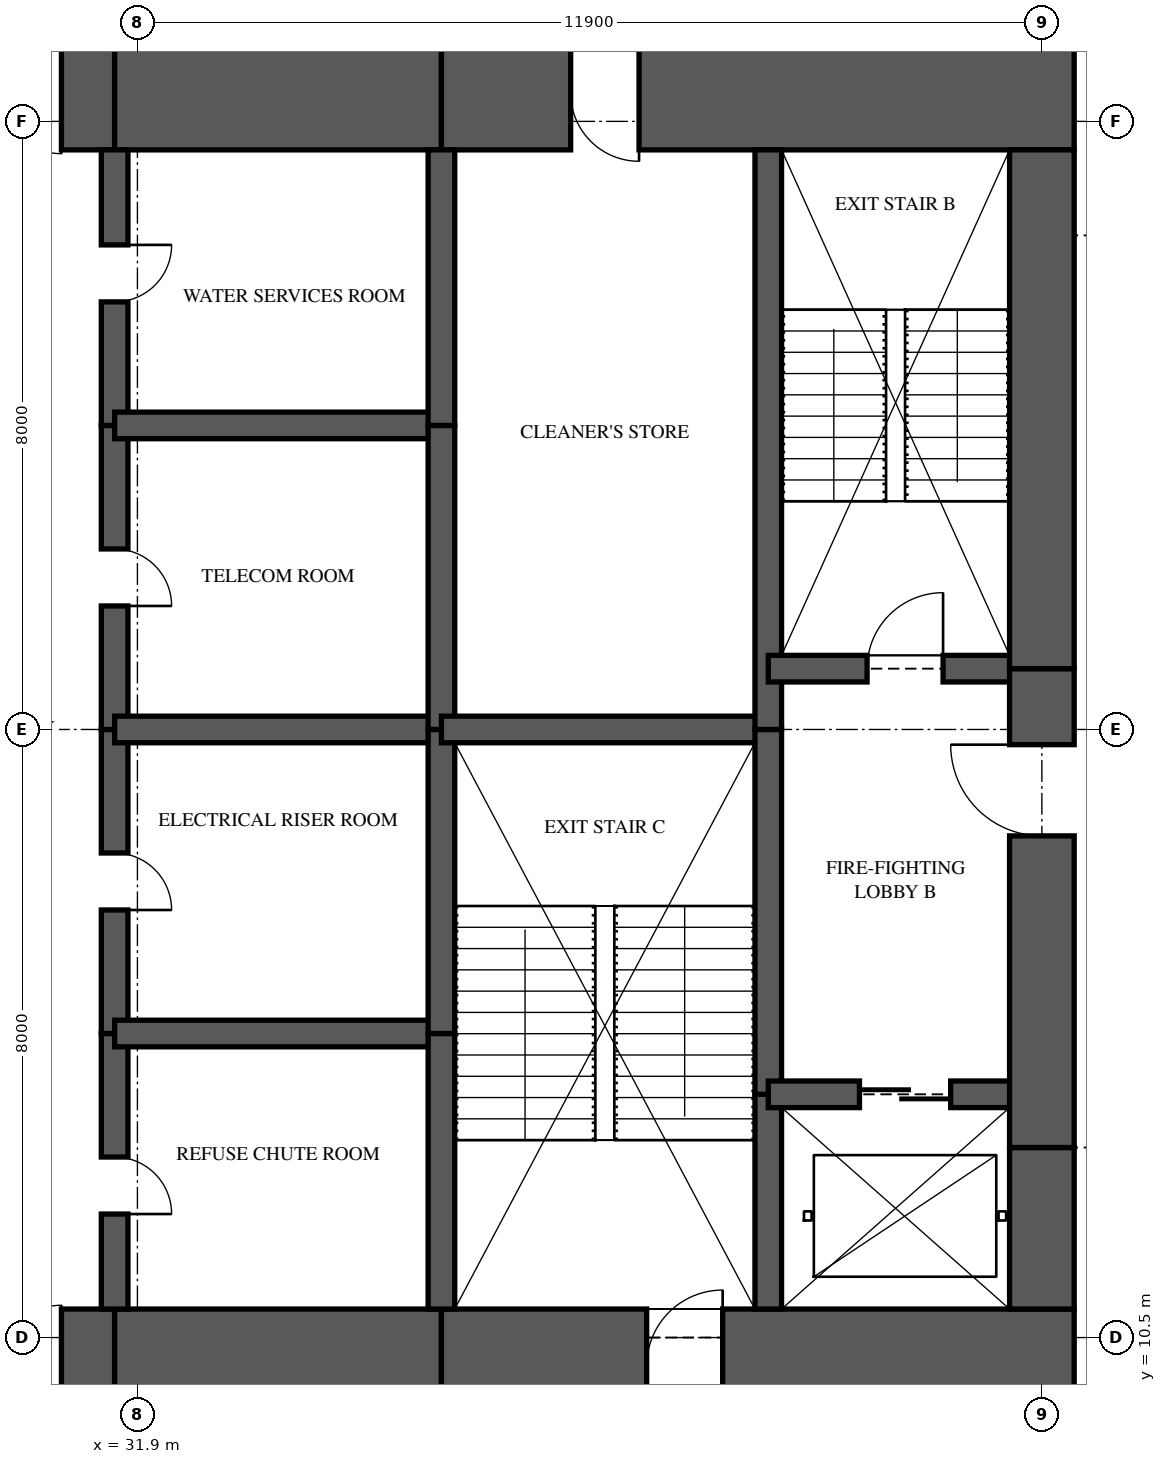
"""IFC4 building model, lengths in metres.
Left out: names, types, materials, properties, quantities, classifications, styles, units other than length and angle.
Written with IfcOpenShell. Run it as: python <this file> out.ifc"""

import sys

from ifc_helpers import new_model, si_unit, direction, frame, frame_2d, origin, place, context, subcontext, project, spatial, rectangle, extrude, element, fill, save


model = new_model("IFC4")
c1 = context("Model", 3, precision=1e-05, world=origin(), true_north=direction((0.0, 1.0)))
c2 = subcontext(c1, "Body", "Model", "MODEL_VIEW")
j1 = project(units=[si_unit("LENGTHUNIT", "METRE"), si_unit("PLANEANGLEUNIT", "RADIAN")], contexts=[c1])
p1 = place(None, origin())
s1 = spatial("IfcSite", under=j1, at=p1, CompositionType="ELEMENT")
p2 = place(p1, origin())
s2 = spatial("IfcBuilding", under=s1, at=p2, CompositionType="ELEMENT")
p3 = place(p2, frame((0.0, 0.0, 128.3)))
s3 = spatial("IfcBuildingStorey", under=s2, at=p3, CompositionType="ELEMENT", Elevation=128.3)
p4 = place(p3, frame((26.0, 10.125, 0.0), z_axis=(0.0, 0.0, 1.0), x_axis=(1.0, 0.0, 0.0)))
e1 = element("IfcWall", 1, at=p4, inside=s3, PredefinedType="SHEAR", context=c2, shape_type="SweptSolid", body=[
    extrude(rectangle(XDim=5.6, YDim=1.5, at=frame_2d((2.8, 0.0))), origin(), (0.0, 0.0, 1.0), 3.35),
])
p5 = place(p4, frame((3.3, 0.0, 0.0)))
e2 = element("IfcOpeningElement", 2, at=p5, cuts=e1, PredefinedType="OPENING", context=c2, shape_type="SweptSolid", body=[
    extrude(rectangle(XDim=1.6, YDim=2.1, at=frame_2d((0.8, 1.05))), frame((0.0, 0.76, 0.0), z_axis=(0.0, -1.0, 0.0), x_axis=(1.0, 0.0, 0.0)), (0.0, 0.0, 1.0), 1.52),
])
p6 = place(p3, frame((31.6, 10.125, 0.0), z_axis=(0.0, 0.0, 1.0), x_axis=(1.0, 0.0, 0.0)))
e3 = element("IfcWall", 3, at=p6, inside=s3, PredefinedType="SHEAR", context=c2, shape_type="SweptSolid", body=[
    extrude(rectangle(XDim=4.3, YDim=1.5, at=frame_2d((2.15, 0.0))), origin(), (0.0, 0.0, 1.0), 3.35),
])
p7 = place(p3, frame((35.9, 10.125, 0.0), z_axis=(0.0, 0.0, 1.0), x_axis=(1.0, 0.0, 0.0)))
e4 = element("IfcWall", 4, at=p7, inside=s3, PredefinedType="SHEAR", context=c2, shape_type="SweptSolid", body=[
    extrude(rectangle(XDim=8.325, YDim=1.5, at=frame_2d((4.163, 0.0))), origin(), (0.0, 0.0, 1.0), 3.35),
])
p8 = place(p7, frame((2.7, 0.0, 0.0)))
e5 = element("IfcOpeningElement", 5, at=p8, cuts=e4, PredefinedType="OPENING", context=c2, shape_type="SweptSolid", body=[
    extrude(rectangle(XDim=1.0, YDim=2.1, at=frame_2d((0.5, 1.05))), frame((0.0, 0.76, 0.0), z_axis=(0.0, -1.0, 0.0), x_axis=(1.0, 0.0, 0.0)), (0.0, 0.0, 1.0), 1.52),
])
p9 = place(p3, frame((44.225, 26.875, 0.0), z_axis=(0.0, 0.0, 1.0), x_axis=(-1.0, 0.0, 0.0)))
e6 = element("IfcWall", 6, at=p9, inside=s3, PredefinedType="SHEAR", context=c2, shape_type="SweptSolid", body=[
    extrude(rectangle(XDim=8.325, YDim=1.5, at=frame_2d((4.163, 0.0))), origin(), (0.0, 0.0, 1.0), 3.35),
])
p10 = place(p9, frame((5.725, 0.0, 0.0)))
e7 = element("IfcOpeningElement", 7, at=p10, cuts=e6, PredefinedType="OPENING", context=c2, shape_type="SweptSolid", body=[
    extrude(rectangle(XDim=0.9, YDim=2.1, at=frame_2d((0.45, 1.05))), frame((0.0, 0.76, 0.0), z_axis=(0.0, -1.0, 0.0), x_axis=(1.0, 0.0, 0.0)), (0.0, 0.0, 1.0), 1.52),
])
p11 = place(p3, frame((35.9, 26.875, 0.0), z_axis=(0.0, 0.0, 1.0), x_axis=(-1.0, 0.0, 0.0)))
e8 = element("IfcWall", 8, at=p11, inside=s3, PredefinedType="SHEAR", context=c2, shape_type="SweptSolid", body=[
    extrude(rectangle(XDim=4.3, YDim=1.5, at=frame_2d((2.15, 0.0))), origin(), (0.0, 0.0, 1.0), 3.35),
])
p12 = place(p3, frame((31.6, 26.875, 0.0), z_axis=(0.0, 0.0, 1.0), x_axis=(-1.0, 0.0, 0.0)))
e9 = element("IfcWall", 9, at=p12, inside=s3, PredefinedType="SHEAR", context=c2, shape_type="SweptSolid", body=[
    extrude(rectangle(XDim=5.6, YDim=1.5, at=frame_2d((2.8, 0.0))), origin(), (0.0, 0.0, 1.0), 3.35),
])
p13 = place(p12, frame((0.7, 0.0, 0.0)))
e10 = element("IfcOpeningElement", 10, at=p13, cuts=e9, PredefinedType="OPENING", context=c2, shape_type="SweptSolid", body=[
    extrude(rectangle(XDim=1.6, YDim=2.1, at=frame_2d((0.8, 1.05))), frame((0.0, 0.76, 0.0), z_axis=(0.0, -1.0, 0.0), x_axis=(1.0, 0.0, 0.0)), (0.0, 0.0, 1.0), 1.52),
])
p14 = place(p3, frame((43.8, 10.875, 0.0), z_axis=(0.0, 0.0, 1.0), x_axis=(0.0, 1.0, 0.0)))
e11 = element("IfcWall", 11, at=p14, inside=s3, PredefinedType="SHEAR", context=c2, shape_type="SweptSolid", body=[
    extrude(rectangle(XDim=2.125, YDim=0.85, at=frame_2d((1.062, 0.0))), origin(), (0.0, 0.0, 1.0), 3.35),
])
p15 = place(p3, frame((43.8, 13.0, 0.0), z_axis=(0.0, 0.0, 1.0), x_axis=(0.0, 1.0, 0.0)))
e12 = element("IfcWall", 12, at=p15, inside=s3, PredefinedType="SHEAR", context=c2, shape_type="SweptSolid", body=[
    extrude(rectangle(XDim=6.3, YDim=0.85, at=frame_2d((3.15, 0.0))), origin(), (0.0, 0.0, 1.0), 3.35),
])
p16 = place(p15, frame((4.1, 0.0, 0.0)))
e13 = element("IfcOpeningElement", 13, at=p16, cuts=e12, PredefinedType="OPENING", context=c2, shape_type="SweptSolid", body=[
    extrude(rectangle(XDim=1.2, YDim=2.2, at=frame_2d((0.6, 1.1))), frame((0.0, 0.435, 0.0), z_axis=(0.0, -1.0, 0.0), x_axis=(1.0, 0.0, 0.0)), (0.0, 0.0, 1.0), 0.87),
])
p17 = place(p3, frame((43.8, 19.3, 0.0), z_axis=(0.0, 0.0, 1.0), x_axis=(0.0, 1.0, 0.0)))
e14 = element("IfcWall", 14, at=p17, inside=s3, PredefinedType="SHEAR", context=c2, shape_type="SweptSolid", body=[
    extrude(rectangle(XDim=6.825, YDim=0.85, at=frame_2d((3.413, 0.0))), origin(), (0.0, 0.0, 1.0), 3.35),
])
p18 = place(p3, frame((31.6, 10.875, 0.0), z_axis=(0.0, 0.0, 1.0), x_axis=(0.0, 1.0, 0.0)))
e15 = element("IfcWall", 15, at=p18, inside=s3, PredefinedType="SHEAR", context=c2, shape_type="SweptSolid", body=[
    extrude(rectangle(XDim=3.625, YDim=0.35, at=frame_2d((1.812, 0.0))), origin(), (0.0, 0.0, 1.0), 3.35),
])
p19 = place(p18, frame((1.25, 0.0, 0.0)))
e16 = element("IfcOpeningElement", 16, at=p19, cuts=e15, PredefinedType="OPENING", context=c2, shape_type="SweptSolid", body=[
    extrude(rectangle(XDim=0.75, YDim=2.1, at=frame_2d((0.375, 1.05))), frame((0.0, 0.185, 0.0), z_axis=(0.0, -1.0, 0.0), x_axis=(1.0, 0.0, 0.0)), (0.0, 0.0, 1.0), 0.37),
])
p20 = place(p3, frame((31.6, 14.5, 0.0), z_axis=(0.0, 0.0, 1.0), x_axis=(0.0, 1.0, 0.0)))
e17 = element("IfcWall", 17, at=p20, inside=s3, PredefinedType="SHEAR", context=c2, shape_type="SweptSolid", body=[
    extrude(rectangle(XDim=4.0, YDim=0.35, at=frame_2d((2.0, 0.0))), origin(), (0.0, 0.0, 1.0), 3.35),
])
p21 = place(p20, frame((1.625, 0.0, 0.0)))
e18 = element("IfcOpeningElement", 18, at=p21, cuts=e17, PredefinedType="OPENING", context=c2, shape_type="SweptSolid", body=[
    extrude(rectangle(XDim=0.75, YDim=2.1, at=frame_2d((0.375, 1.05))), frame((0.0, 0.185, 0.0), z_axis=(0.0, -1.0, 0.0), x_axis=(1.0, 0.0, 0.0)), (0.0, 0.0, 1.0), 0.37),
])
p22 = place(p3, frame((31.6, 18.5, 0.0), z_axis=(0.0, 0.0, 1.0), x_axis=(0.0, 1.0, 0.0)))
e19 = element("IfcWall", 19, at=p22, inside=s3, PredefinedType="SHEAR", context=c2, shape_type="SweptSolid", body=[
    extrude(rectangle(XDim=4.0, YDim=0.35, at=frame_2d((2.0, 0.0))), origin(), (0.0, 0.0, 1.0), 3.35),
])
p23 = place(p22, frame((1.625, 0.0, 0.0)))
e20 = element("IfcOpeningElement", 20, at=p23, cuts=e19, PredefinedType="OPENING", context=c2, shape_type="SweptSolid", body=[
    extrude(rectangle(XDim=0.75, YDim=2.1, at=frame_2d((0.375, 1.05))), frame((0.0, 0.185, 0.0), z_axis=(0.0, -1.0, 0.0), x_axis=(1.0, 0.0, 0.0)), (0.0, 0.0, 1.0), 0.37),
])
p24 = place(p3, frame((31.6, 22.5, 0.0), z_axis=(0.0, 0.0, 1.0), x_axis=(0.0, 1.0, 0.0)))
e21 = element("IfcWall", 21, at=p24, inside=s3, PredefinedType="SHEAR", context=c2, shape_type="SweptSolid", body=[
    extrude(rectangle(XDim=3.625, YDim=0.35, at=frame_2d((1.812, 0.0))), origin(), (0.0, 0.0, 1.0), 3.35),
])
p25 = place(p24, frame((1.625, 0.0, 0.0)))
e22 = element("IfcOpeningElement", 22, at=p25, cuts=e21, PredefinedType="OPENING", context=c2, shape_type="SweptSolid", body=[
    extrude(rectangle(XDim=0.75, YDim=2.1, at=frame_2d((0.375, 1.05))), frame((0.0, 0.185, 0.0), z_axis=(0.0, -1.0, 0.0), x_axis=(1.0, 0.0, 0.0)), (0.0, 0.0, 1.0), 0.37),
])
p26 = place(p3, frame((35.9, 10.875, 0.0), z_axis=(0.0, 0.0, 1.0), x_axis=(0.0, 1.0, 0.0)))
e23 = element("IfcWall", 23, at=p26, inside=s3, PredefinedType="SHEAR", context=c2, shape_type="SweptSolid", body=[
    extrude(rectangle(XDim=3.625, YDim=0.35, at=frame_2d((1.812, 0.0))), origin(), (0.0, 0.0, 1.0), 3.35),
])
for number, where, z_axis, x_axis in (
    (24, (35.9, 14.5, 0.0), (0.0, 0.0, 1.0), (0.0, 1.0, 0.0)),
    (25, (35.9, 18.5, 0.0), (0.0, 0.0, 1.0), (0.0, 1.0, 0.0)),
):
    element("IfcWall", number, at=place(p3, frame(where, z_axis=z_axis, x_axis=x_axis)), inside=s3, PredefinedType="SHEAR", context=c2, shape_type="SweptSolid", body=[
        extrude(rectangle(XDim=4.0, YDim=0.35, at=frame_2d((2.0, 0.0))), origin(), (0.0, 0.0, 1.0), 3.35),
    ])
p27 = place(p3, frame((35.9, 22.5, 0.0), z_axis=(0.0, 0.0, 1.0), x_axis=(0.0, 1.0, 0.0)))
e26 = element("IfcWall", 26, at=p27, inside=s3, PredefinedType="SHEAR", context=c2, shape_type="SweptSolid", body=[
    extrude(rectangle(XDim=3.625, YDim=0.35, at=frame_2d((1.812, 0.0))), origin(), (0.0, 0.0, 1.0), 3.35),
])
p28 = place(p3, frame((40.2, 10.875, 0.0), z_axis=(0.0, 0.0, 1.0), x_axis=(0.0, 1.0, 0.0)))
e27 = element("IfcWall", 27, at=p28, inside=s3, PredefinedType="SHEAR", context=c2, shape_type="SweptSolid", body=[
    extrude(rectangle(XDim=2.825, YDim=0.35, at=frame_2d((1.413, 0.0))), origin(), (0.0, 0.0, 1.0), 3.35),
])
p29 = place(p3, frame((40.2, 13.7, 0.0), z_axis=(0.0, 0.0, 1.0), x_axis=(0.0, 1.0, 0.0)))
e28 = element("IfcWall", 28, at=p29, inside=s3, PredefinedType="SHEAR", context=c2, shape_type="SweptSolid", body=[
    extrude(rectangle(XDim=4.8, YDim=0.35, at=frame_2d((2.4, 0.0))), origin(), (0.0, 0.0, 1.0), 3.35),
])
p30 = place(p3, frame((40.2, 18.5, 0.0), z_axis=(0.0, 0.0, 1.0), x_axis=(0.0, 1.0, 0.0)))
e29 = element("IfcWall", 29, at=p30, inside=s3, PredefinedType="SHEAR", context=c2, shape_type="SweptSolid", body=[
    extrude(rectangle(XDim=7.625, YDim=0.35, at=frame_2d((3.812, 0.0))), origin(), (0.0, 0.0, 1.0), 3.35),
])
for number, where, z_axis, x_axis in (
    (30, (31.6, 14.5, 0.0), (0.0, 0.0, 1.0), (1.0, 0.0, 0.0)),
    (31, (31.6, 18.5, 0.0), (0.0, 0.0, 1.0), (1.0, 0.0, 0.0)),
    (32, (31.6, 22.5, 0.0), (0.0, 0.0, 1.0), (1.0, 0.0, 0.0)),
):
    element("IfcWall", number, at=place(p3, frame(where, z_axis=z_axis, x_axis=x_axis)), inside=s3, PredefinedType="SHEAR", context=c2, shape_type="SweptSolid", body=[
        extrude(rectangle(XDim=4.3, YDim=0.35, at=frame_2d((2.15, 0.0))), origin(), (0.0, 0.0, 1.0), 3.35),
    ])
p31 = place(p3, frame((35.9, 18.5, 0.0), z_axis=(0.0, 0.0, 1.0), x_axis=(1.0, 0.0, 0.0)))
e33 = element("IfcWall", 33, at=p31, inside=s3, PredefinedType="SHEAR", context=c2, shape_type="SweptSolid", body=[
    extrude(rectangle(XDim=4.3, YDim=0.35, at=frame_2d((2.15, 0.0))), origin(), (0.0, 0.0, 1.0), 3.35),
])
p32 = place(p3, frame((40.2, 13.7, 0.0), z_axis=(0.0, 0.0, 1.0), x_axis=(1.0, 0.0, 0.0)))
e34 = element("IfcWall", 34, at=p32, inside=s3, PredefinedType="SHEAR", context=c2, shape_type="SweptSolid", body=[
    extrude(rectangle(XDim=3.6, YDim=0.35, at=frame_2d((1.8, 0.0))), origin(), (0.0, 0.0, 1.0), 3.35),
])
p33 = place(p32, frame((1.2, 0.0, 0.0)))
e35 = element("IfcOpeningElement", 35, at=p33, cuts=e34, PredefinedType="OPENING", context=c2, shape_type="SweptSolid", body=[
    extrude(rectangle(XDim=1.2, YDim=2.1, at=frame_2d((0.6, 1.05))), frame((0.0, 0.185, 0.0), z_axis=(0.0, -1.0, 0.0), x_axis=(1.0, 0.0, 0.0)), (0.0, 0.0, 1.0), 0.37),
])
p34 = place(p3, frame((40.2, 19.3, 0.0), z_axis=(0.0, 0.0, 1.0), x_axis=(1.0, 0.0, 0.0)))
e36 = element("IfcWall", 36, at=p34, inside=s3, PredefinedType="SHEAR", context=c2, shape_type="SweptSolid", body=[
    extrude(rectangle(XDim=3.6, YDim=0.35, at=frame_2d((1.8, 0.0))), origin(), (0.0, 0.0, 1.0), 3.35),
])
p35 = place(p34, frame((1.3, 0.0, 0.0)))
e37 = element("IfcOpeningElement", 37, at=p35, cuts=e36, PredefinedType="OPENING", context=c2, shape_type="SweptSolid", body=[
    extrude(rectangle(XDim=1.0, YDim=2.1, at=frame_2d((0.5, 1.05))), frame((0.0, 0.185, 0.0), z_axis=(0.0, -1.0, 0.0), x_axis=(1.0, 0.0, 0.0)), (0.0, 0.0, 1.0), 0.37),
])
p36 = place(p35, origin())
e38 = element("IfcDoor", 38, at=p36, inside=s3, OperationType="SINGLE_SWING_RIGHT", PredefinedType="DOOR", context=c2, shape_type="SweptSolid", body=[
    extrude(rectangle(XDim=1.0, YDim=2.1, at=frame_2d((0.5, 1.05))), frame((0.0, 0.025, 0.0), z_axis=(0.0, -1.0, 0.0), x_axis=(1.0, 0.0, 0.0)), (0.0, 0.0, 1.0), 0.05),
])
fill(e37, e38)
p37 = place(p16, origin())
e39 = element("IfcDoor", 39, at=p37, inside=s3, OperationType="SINGLE_SWING_RIGHT", PredefinedType="DOOR", context=c2, shape_type="SweptSolid", body=[
    extrude(rectangle(XDim=1.2, YDim=2.2, at=frame_2d((0.6, 1.1))), frame((0.0, 0.025, 0.0), z_axis=(0.0, -1.0, 0.0), x_axis=(1.0, 0.0, 0.0)), (0.0, 0.0, 1.0), 0.05),
])
fill(e13, e39)
p38 = place(p33, origin())
e40 = element("IfcDoor", 40, at=p38, inside=s3, OperationType="SLIDING_TO_LEFT", PredefinedType="DOOR", context=c2, shape_type="SweptSolid", body=[
    extrude(rectangle(XDim=1.2, YDim=2.1, at=frame_2d((0.6, 1.05))), frame((0.0, 0.025, 0.0), z_axis=(0.0, -1.0, 0.0), x_axis=(1.0, 0.0, 0.0)), (0.0, 0.0, 1.0), 0.05),
])
fill(e35, e40)
p39 = place(p5, origin())
e41 = element("IfcDoor", 41, at=p39, inside=s3, OperationType="DOUBLE_DOOR_SINGLE_SWING", PredefinedType="DOOR", context=c2, shape_type="SweptSolid", body=[
    extrude(rectangle(XDim=1.6, YDim=2.1, at=frame_2d((0.8, 1.05))), frame((0.0, 0.025, 0.0), z_axis=(0.0, -1.0, 0.0), x_axis=(1.0, 0.0, 0.0)), (0.0, 0.0, 1.0), 0.05),
])
fill(e2, e41)
p40 = place(p13, origin())
e42 = element("IfcDoor", 42, at=p40, inside=s3, OperationType="DOUBLE_DOOR_SINGLE_SWING", PredefinedType="DOOR", context=c2, shape_type="SweptSolid", body=[
    extrude(rectangle(XDim=1.6, YDim=2.1, at=frame_2d((0.8, 1.05))), frame((0.0, 0.025, 0.0), z_axis=(0.0, -1.0, 0.0), x_axis=(1.0, 0.0, 0.0)), (0.0, 0.0, 1.0), 0.05),
])
fill(e10, e42)
p41 = place(p19, frame((0.75, 0.0, 0.0), z_axis=(0.0, 0.0, 1.0), x_axis=(-1.0, 0.0, 0.0)))
e43 = element("IfcDoor", 43, at=p41, inside=s3, OperationType="SINGLE_SWING_RIGHT", PredefinedType="DOOR", context=c2, shape_type="SweptSolid", body=[
    extrude(rectangle(XDim=0.75, YDim=2.1, at=frame_2d((0.375, 1.05))), frame((0.0, 0.025, 0.0), z_axis=(0.0, -1.0, 0.0), x_axis=(1.0, 0.0, 0.0)), (0.0, 0.0, 1.0), 0.05),
])
fill(e16, e43)
p42 = place(p21, frame((0.75, 0.0, 0.0), z_axis=(0.0, 0.0, 1.0), x_axis=(-1.0, 0.0, 0.0)))
e44 = element("IfcDoor", 44, at=p42, inside=s3, OperationType="SINGLE_SWING_RIGHT", PredefinedType="DOOR", context=c2, shape_type="SweptSolid", body=[
    extrude(rectangle(XDim=0.75, YDim=2.1, at=frame_2d((0.375, 1.05))), frame((0.0, 0.025, 0.0), z_axis=(0.0, -1.0, 0.0), x_axis=(1.0, 0.0, 0.0)), (0.0, 0.0, 1.0), 0.05),
])
fill(e18, e44)
p43 = place(p23, frame((0.75, 0.0, 0.0), z_axis=(0.0, 0.0, 1.0), x_axis=(-1.0, 0.0, 0.0)))
e45 = element("IfcDoor", 45, at=p43, inside=s3, OperationType="SINGLE_SWING_RIGHT", PredefinedType="DOOR", context=c2, shape_type="SweptSolid", body=[
    extrude(rectangle(XDim=0.75, YDim=2.1, at=frame_2d((0.375, 1.05))), frame((0.0, 0.025, 0.0), z_axis=(0.0, -1.0, 0.0), x_axis=(1.0, 0.0, 0.0)), (0.0, 0.0, 1.0), 0.05),
])
fill(e20, e45)
p44 = place(p25, frame((0.75, 0.0, 0.0), z_axis=(0.0, 0.0, 1.0), x_axis=(-1.0, 0.0, 0.0)))
e46 = element("IfcDoor", 46, at=p44, inside=s3, OperationType="SINGLE_SWING_LEFT", PredefinedType="DOOR", context=c2, shape_type="SweptSolid", body=[
    extrude(rectangle(XDim=0.75, YDim=2.1, at=frame_2d((0.375, 1.05))), frame((0.0, 0.025, 0.0), z_axis=(0.0, -1.0, 0.0), x_axis=(1.0, 0.0, 0.0)), (0.0, 0.0, 1.0), 0.05),
])
fill(e22, e46)
p45 = place(p8, origin())
e47 = element("IfcDoor", 47, at=p45, inside=s3, OperationType="SINGLE_SWING_RIGHT", PredefinedType="DOOR", context=c2, shape_type="SweptSolid", body=[
    extrude(rectangle(XDim=1.0, YDim=2.1, at=frame_2d((0.5, 1.05))), frame((0.0, 0.025, 0.0), z_axis=(0.0, -1.0, 0.0), x_axis=(1.0, 0.0, 0.0)), (0.0, 0.0, 1.0), 0.05),
])
fill(e5, e47)
p46 = place(p10, origin())
e48 = element("IfcDoor", 48, at=p46, inside=s3, OperationType="SINGLE_SWING_LEFT", PredefinedType="DOOR", context=c2, shape_type="SweptSolid", body=[
    extrude(rectangle(XDim=0.9, YDim=2.1, at=frame_2d((0.45, 1.05))), frame((0.0, 0.47, 0.0), z_axis=(0.0, -1.0, 0.0), x_axis=(1.0, 0.0, 0.0)), (0.0, 0.0, 1.0), 0.8),
])
fill(e7, e48)
save(model, sys.argv[1])
